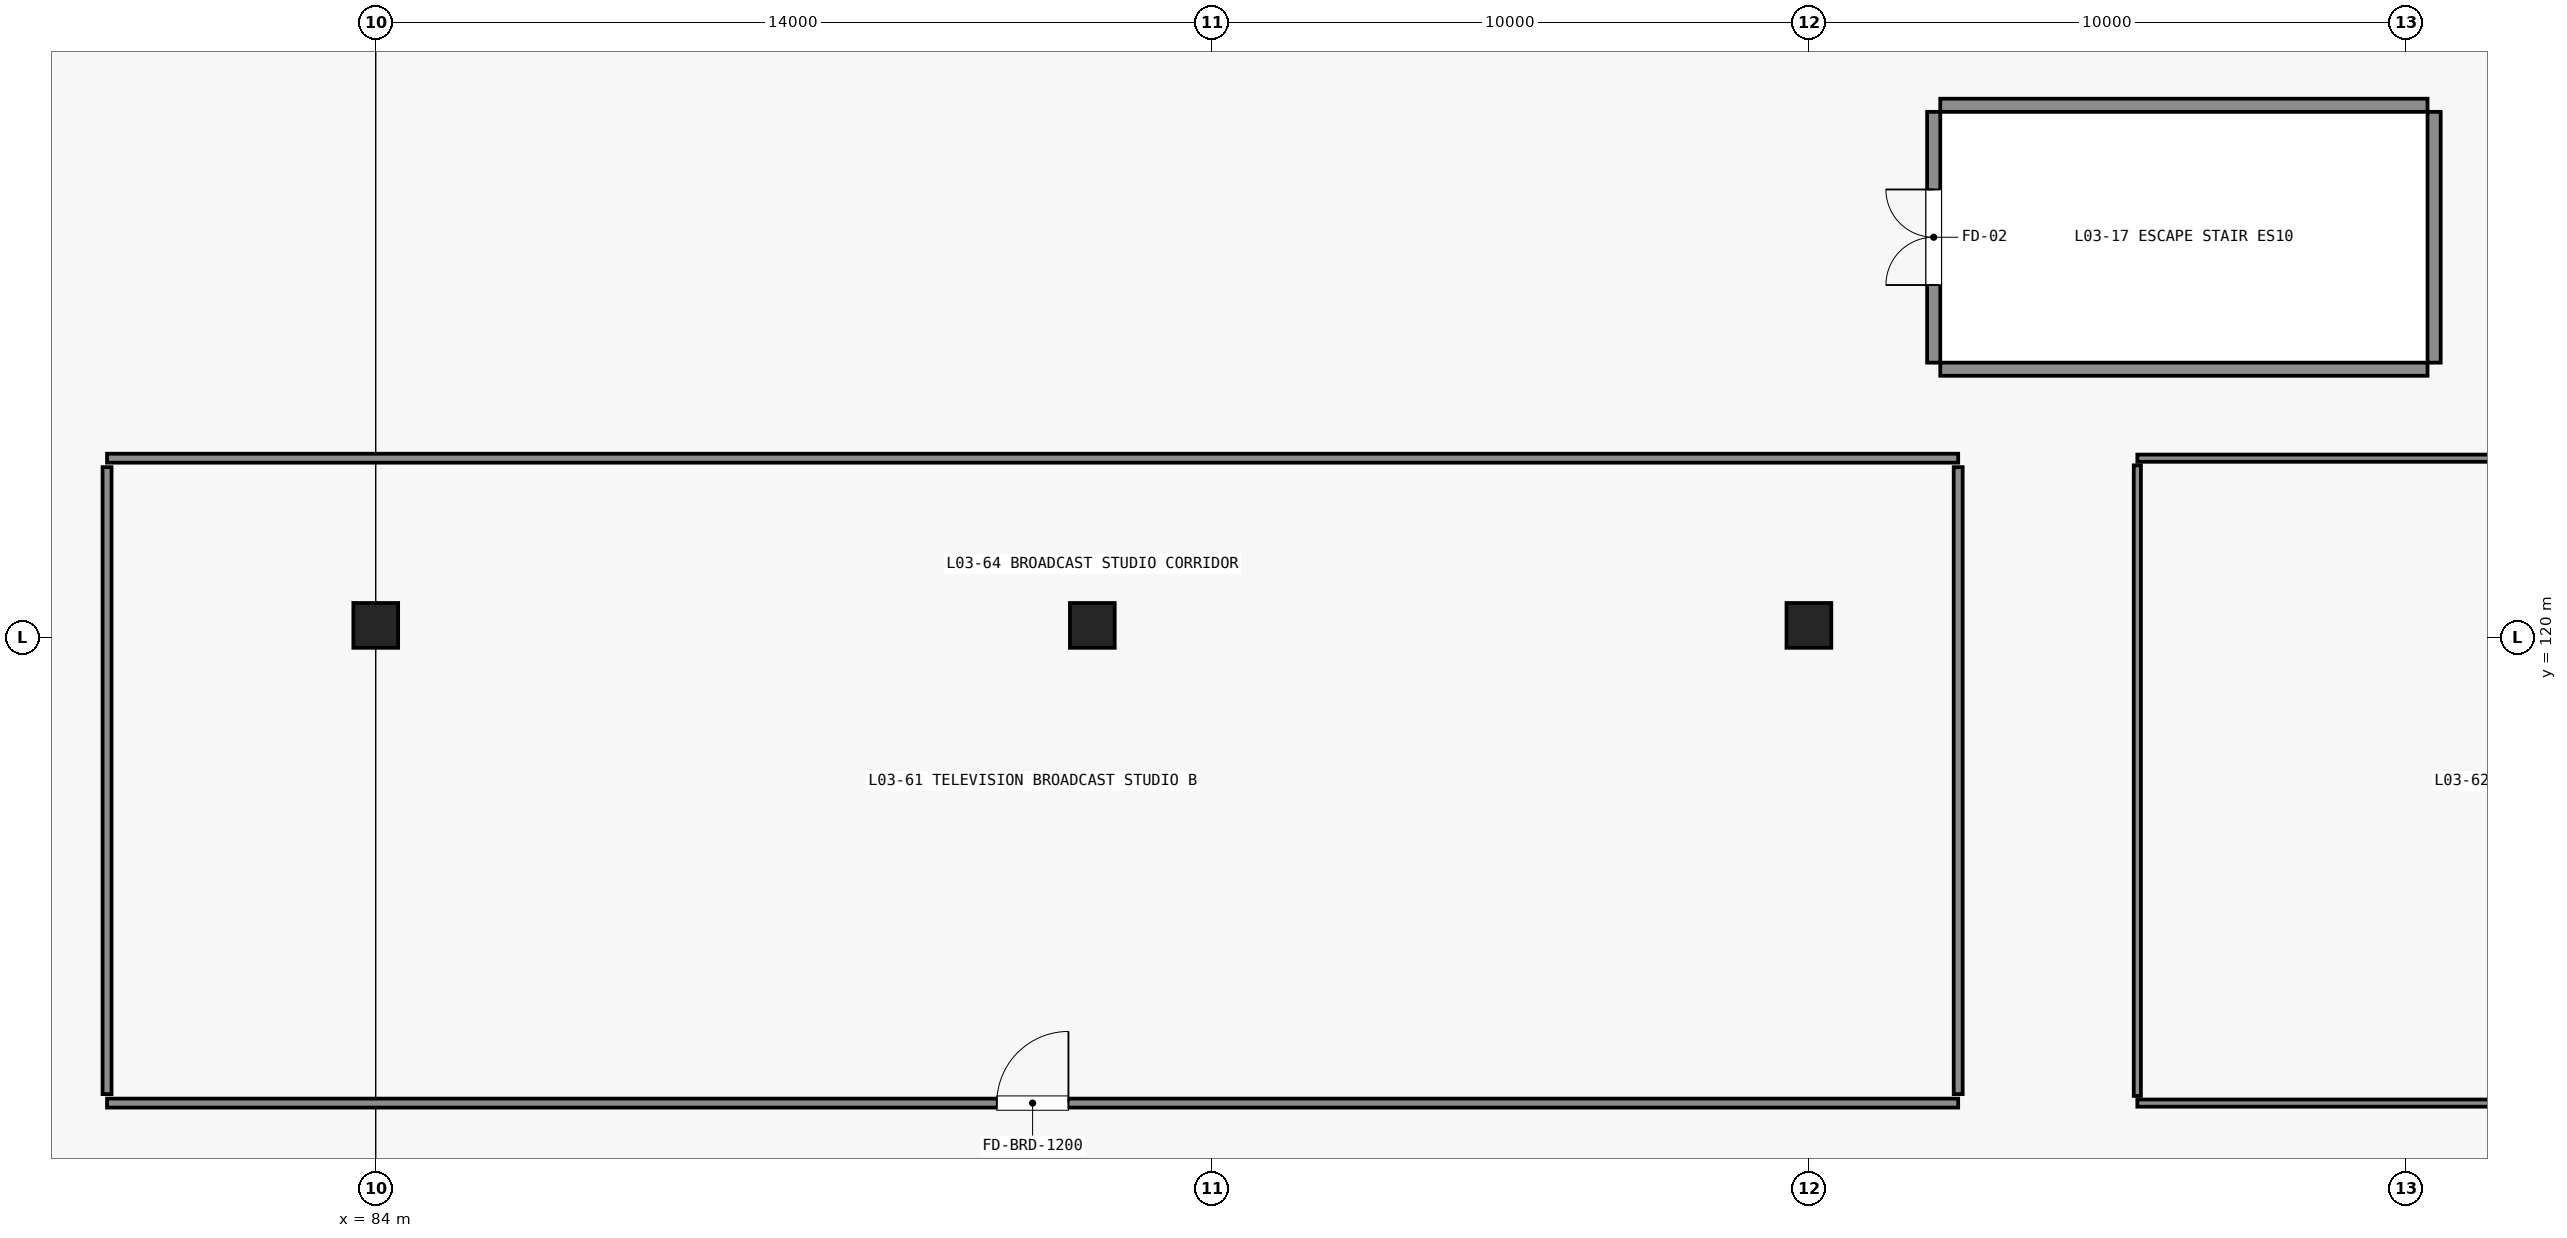
"""IFC4 building model, lengths in metres.
Left out: names, types, materials, properties, quantities, classifications, styles, units other than length and angle.
Written with IfcOpenShell. Run it as: python <this file> out.ifc"""

import sys

from ifc_helpers import new_model, si_unit, direction, frame, frame_2d, origin, origin_2d, place, context, subcontext, project, spatial, rectangle, extrude, element, fill, save


model = new_model("IFC4")
c1 = context("Model", 3, precision=1e-05, world=origin(), true_north=direction((0.0, 1.0)))
c2 = subcontext(c1, "Body", "Model", "MODEL_VIEW")
j1 = project(units=[si_unit("LENGTHUNIT", "METRE"), si_unit("PLANEANGLEUNIT", "RADIAN")], contexts=[c1])
p1 = place(None, origin())
s1 = spatial("IfcSite", under=j1, at=p1, CompositionType="ELEMENT")
p2 = place(p1, origin())
s2 = spatial("IfcBuilding", under=s1, at=p2, CompositionType="ELEMENT")
p3 = place(p2, frame((0.0, 0.0, 16.2)))
s3 = spatial("IfcBuildingStorey", under=s2, at=p3, CompositionType="ELEMENT", Elevation=16.2)
for number, where, z_axis, x_axis in (
    (1, (84.0, 120.2, 0.0), (0.0, 0.0, 1.0), (1.0, 0.0, 0.0)),
    (2, (96.0, 120.2, 0.0), (0.0, 0.0, 1.0), (1.0, 0.0, 0.0)),
    (3, (108.0, 120.2, 0.0), (0.0, 0.0, 1.0), (1.0, 0.0, 0.0)),
):
    element("IfcColumn", number, at=place(p3, frame(where, z_axis=z_axis, x_axis=x_axis)), inside=s3, PredefinedType="COLUMN", context=c2, shape_type="SweptSolid", body=[
        extrude(rectangle(XDim=0.75, YDim=0.75, at=origin_2d()), origin(), (0.0, 0.0, 1.0), 4.46),
    ])
for number, where, z_axis, x_axis in (
    (4, (110.2, 124.49, 0.0), (0.0, 0.0, 1.0), (1.0, 0.0, 0.0)),
    (5, (110.2, 128.91, 0.0), (0.0, 0.0, 1.0), (1.0, 0.0, 0.0)),
):
    element("IfcWall", number, at=place(p3, frame(where, z_axis=z_axis, x_axis=x_axis)), inside=s3, PredefinedType="SHEAR", context=c2, shape_type="SweptSolid", body=[
        extrude(rectangle(XDim=8.16, YDim=0.22, at=frame_2d((4.08, 0.0))), origin(), (0.0, 0.0, 1.0), 4.46),
    ])
p4 = place(p3, frame((110.09, 124.6, 0.0), z_axis=(0.0, 0.0, 1.0), x_axis=(0.0, 1.0, 0.0)))
e6 = element("IfcWall", 6, at=p4, inside=s3, PredefinedType="SHEAR", context=c2, shape_type="SweptSolid", body=[
    extrude(rectangle(XDim=4.2, YDim=0.22, at=frame_2d((2.1, 0.0))), origin(), (0.0, 0.0, 1.0), 4.46),
])
p5 = place(p4, frame((1.3, 0.0, 0.0)))
e7 = element("IfcOpeningElement", 7, at=p5, cuts=e6, PredefinedType="OPENING", context=c2, shape_type="SweptSolid", body=[
    extrude(rectangle(XDim=1.6, YDim=2.2, at=frame_2d((0.8, 1.1))), frame((0.0, 0.12, 0.0), z_axis=(0.0, -1.0, 0.0), x_axis=(1.0, 0.0, 0.0)), (0.0, 0.0, 1.0), 0.24),
])
p6 = place(p3, frame((118.47, 124.6, 0.0), z_axis=(0.0, 0.0, 1.0), x_axis=(0.0, 1.0, 0.0)))
e8 = element("IfcWall", 8, at=p6, inside=s3, PredefinedType="SHEAR", context=c2, shape_type="SweptSolid", body=[
    extrude(rectangle(XDim=4.2, YDim=0.22, at=frame_2d((2.1, 0.0))), origin(), (0.0, 0.0, 1.0), 4.46),
])
p7 = place(p3, frame((79.5, 112.2, 0.0), z_axis=(0.0, 0.0, 1.0), x_axis=(1.0, 0.0, 0.0)))
e9 = element("IfcWall", 9, at=p7, inside=s3, PredefinedType="STANDARD", context=c2, shape_type="SweptSolid", body=[
    extrude(rectangle(XDim=31.0, YDim=0.15, at=frame_2d((15.5, 0.0))), origin(), (0.0, 0.0, 1.0), 3.848),
])
p8 = place(p7, frame((14.9, 0.0, 0.0)))
e10 = element("IfcOpeningElement", 10, at=p8, cuts=e9, PredefinedType="OPENING", context=c2, shape_type="SweptSolid", body=[
    extrude(rectangle(XDim=1.2, YDim=2.2, at=frame_2d((0.6, 1.1))), frame((0.0, 0.085, 0.0), z_axis=(0.0, -1.0, 0.0), x_axis=(1.0, 0.0, 0.0)), (0.0, 0.0, 1.0), 0.17),
])
p9 = place(p3, frame((79.5, 123.0, 0.0), z_axis=(0.0, 0.0, 1.0), x_axis=(1.0, 0.0, 0.0)))
e11 = element("IfcWall", 11, at=p9, inside=s3, PredefinedType="STANDARD", context=c2, shape_type="SweptSolid", body=[
    extrude(rectangle(XDim=31.0, YDim=0.15, at=frame_2d((15.5, 0.0))), origin(), (0.0, 0.0, 1.0), 3.848),
])
for number, where, z_axis, x_axis in (
    (12, (79.5, 112.35, 0.0), (0.0, 0.0, 1.0), (0.0, 1.0, 0.0)),
    (13, (110.5, 112.35, 0.0), (0.0, 0.0, 1.0), (0.0, 1.0, 0.0)),
):
    element("IfcWall", number, at=place(p3, frame(where, z_axis=z_axis, x_axis=x_axis)), inside=s3, PredefinedType="STANDARD", context=c2, shape_type="SweptSolid", body=[
        extrude(rectangle(XDim=10.5, YDim=0.15, at=frame_2d((5.25, 0.0))), origin(), (0.0, 0.0, 1.0), 3.848),
    ])
p10 = place(p3, frame((113.5, 112.2, 0.0), z_axis=(0.0, 0.0, 1.0), x_axis=(1.0, 0.0, 0.0)))
e14 = element("IfcWall", 14, at=p10, inside=s3, PredefinedType="PARTITIONING", context=c2, shape_type="SweptSolid", body=[
    extrude(rectangle(XDim=30.5, YDim=0.12, at=frame_2d((15.25, 0.0))), origin(), (0.0, 0.0, 1.0), 3.848),
])
p11 = place(p10, frame((14.7, 0.0, 0.0)))
e15 = element("IfcOpeningElement", 15, at=p11, cuts=e14, PredefinedType="OPENING", context=c2, shape_type="SweptSolid", body=[
    extrude(rectangle(XDim=1.1, YDim=2.2, at=frame_2d((0.55, 1.1))), frame((0.0, 0.07, 0.0), z_axis=(0.0, -1.0, 0.0), x_axis=(1.0, 0.0, 0.0)), (0.0, 0.0, 1.0), 0.14),
])
p12 = place(p3, frame((113.5, 123.0, 0.0), z_axis=(0.0, 0.0, 1.0), x_axis=(1.0, 0.0, 0.0)))
e16 = element("IfcWall", 16, at=p12, inside=s3, PredefinedType="PARTITIONING", context=c2, shape_type="SweptSolid", body=[
    extrude(rectangle(XDim=30.5, YDim=0.12, at=frame_2d((15.25, 0.0))), origin(), (0.0, 0.0, 1.0), 3.848),
])
p13 = place(p3, frame((113.5, 112.32, 0.0), z_axis=(0.0, 0.0, 1.0), x_axis=(0.0, 1.0, 0.0)))
e17 = element("IfcWall", 17, at=p13, inside=s3, PredefinedType="PARTITIONING", context=c2, shape_type="SweptSolid", body=[
    extrude(rectangle(XDim=10.56, YDim=0.12, at=frame_2d((5.28, 0.0))), origin(), (0.0, 0.0, 1.0), 3.848),
])
p14 = place(p5, origin())
e18 = element("IfcDoor", 18, at=p14, inside=s3, OperationType="DOUBLE_DOOR_SINGLE_SWING", PredefinedType="DOOR", context=c2, shape_type="SweptSolid", body=[
    extrude(rectangle(XDim=1.6, YDim=2.2, at=frame_2d((0.8, 1.1))), frame((0.0, 0.025, 0.0), z_axis=(0.0, -1.0, 0.0), x_axis=(1.0, 0.0, 0.0)), (0.0, 0.0, 1.0), 0.05),
])
fill(e7, e18)
p15 = place(p8, origin())
e19 = element("IfcDoor", 19, at=p15, inside=s3, OperationType="SINGLE_SWING_RIGHT", PredefinedType="DOOR", context=c2, shape_type="SweptSolid", body=[
    extrude(rectangle(XDim=1.2, YDim=2.2, at=frame_2d((0.6, 1.1))), frame((0.0, 0.025, 0.0), z_axis=(0.0, -1.0, 0.0), x_axis=(1.0, 0.0, 0.0)), (0.0, 0.0, 1.0), 0.05),
])
fill(e10, e19)
save(model, sys.argv[1])
